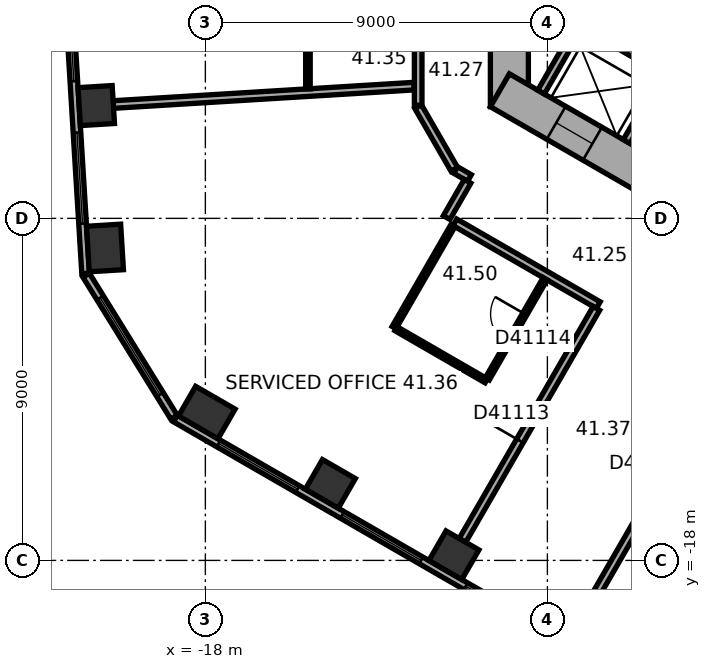
"""IFC4 building model, lengths in metres.
Left out: names, types, materials, properties, quantities, classifications, styles, units other than length and angle.
Written with IfcOpenShell. Run it as: python <this file> out.ifc"""

import sys

from ifc_helpers import new_model, si_unit, direction, frame, frame_2d, origin, origin_2d, place, context, subcontext, project, spatial, rectangle, extrude, element, fill, save


model = new_model("IFC4")
c1 = context("Model", 3, precision=1e-05, world=origin(), true_north=direction((0.0, 1.0)))
c2 = subcontext(c1, "Body", "Model", "MODEL_VIEW")
j1 = project(units=[si_unit("LENGTHUNIT", "METRE"), si_unit("PLANEANGLEUNIT", "RADIAN")], contexts=[c1])
p1 = place(None, origin())
s1 = spatial("IfcSite", under=j1, at=p1, CompositionType="ELEMENT")
p2 = place(p1, origin())
s2 = spatial("IfcBuilding", under=s1, at=p2, CompositionType="ELEMENT")
p3 = place(p2, frame((0.0, 0.0, 168.8)))
s3 = spatial("IfcBuildingStorey", under=s2, at=p3, CompositionType="ELEMENT", Elevation=168.8)
p4 = place(p3, frame((-20.871, -6.032, 0.0), z_axis=(0.0, 0.0, 1.0), x_axis=(0.061048539535, -0.998134798422, 0.0)))
e1 = element("IfcColumn", 1, at=p4, inside=s3, PredefinedType="COLUMN", context=c2, shape_type="SweptSolid", body=[
    extrude(rectangle(XDim=1.0, YDim=0.9, at=origin_2d()), origin(), (0.0, 0.0, 1.0), 3.7),
])
for number, where, z_axis, x_axis in (
    (2, (-20.642, -9.779, 0.0), (0.0, 0.0, 1.0), (0.061, -0.998, 0.0)),
    (3, (-17.962, -14.109, 0.0), (0.0, 0.0, 1.0), (0.866, -0.5, 0.0)),
):
    element("IfcColumn", number, at=place(p3, frame(where, z_axis=z_axis, x_axis=x_axis)), inside=s3, PredefinedType="COLUMN", context=c2, shape_type="SweptSolid", body=[
        extrude(rectangle(XDim=1.2, YDim=0.9, at=origin_2d()), origin(), (0.0, 0.0, 1.0), 3.7),
    ])
for number, where, z_axis, x_axis in (
    (4, (-14.711, -15.986, 0.0), (0.0, 0.0, 1.0), (0.866, -0.5, 0.0)),
    (5, (-11.46, -17.863, 0.0), (0.0, 0.0, 1.0), (0.866, -0.5, 0.0)),
):
    element("IfcColumn", number, at=place(p3, frame(where, z_axis=z_axis, x_axis=x_axis)), inside=s3, PredefinedType="COLUMN", context=c2, shape_type="SweptSolid", body=[
        extrude(rectangle(XDim=1.0, YDim=0.9, at=origin_2d()), origin(), (0.0, 0.0, 1.0), 3.7),
    ])
p5 = place(p3, frame((-10.0, 6.062, 0.0), z_axis=(0.0, 0.0, 1.0), x_axis=(0.0, -1.0, 0.0)))
e6 = element("IfcWall", 6, at=p5, inside=s3, PredefinedType="SHEAR", context=c2, shape_type="SweptSolid", body=[
    extrude(rectangle(XDim=12.125, YDim=1.0, at=frame_2d((6.062, 0.0))), origin(), (0.0, 0.0, 1.0), 3.7),
])
p6 = place(p5, frame((5.212, 0.0, 0.0)))
e7 = element("IfcOpeningElement", 7, at=p6, cuts=e6, PredefinedType="OPENING", context=c2, shape_type="SweptSolid", body=[
    extrude(rectangle(XDim=1.1, YDim=2.1, at=frame_2d((0.55, 1.05))), frame((0.0, 0.51, 0.0), z_axis=(0.0, -1.0, 0.0), x_axis=(1.0, 0.0, 0.0)), (0.0, 0.0, 1.0), 1.02),
])
p7 = place(p5, frame((7.812, 0.0, 0.0)))
e8 = element("IfcOpeningElement", 8, at=p7, cuts=e6, PredefinedType="OPENING", context=c2, shape_type="SweptSolid", body=[
    extrude(rectangle(XDim=1.1, YDim=2.1, at=frame_2d((0.55, 1.05))), frame((0.0, 0.51, 0.0), z_axis=(0.0, -1.0, 0.0), x_axis=(1.0, 0.0, 0.0)), (0.0, 0.0, 1.0), 1.02),
])
p8 = place(p3, frame((-10.25, -5.629, 0.0), z_axis=(0.0, 0.0, 1.0), x_axis=(0.866022616891, -0.50000482701, 0.0)))
e9 = element("IfcWall", 9, at=p8, inside=s3, PredefinedType="SHEAR", context=c2, shape_type="SweptSolid", body=[
    extrude(rectangle(XDim=12.125, YDim=1.0, at=frame_2d((6.062, 0.0))), origin(), (0.0, 0.0, 1.0), 3.7),
])
p9 = place(p8, frame((6.262, 0.0, 0.0)))
e10 = element("IfcOpeningElement", 10, at=p9, cuts=e9, PredefinedType="OPENING", context=c2, shape_type="SweptSolid", body=[
    extrude(rectangle(XDim=1.5, YDim=2.1, at=frame_2d((0.75, 1.05))), frame((0.0, 0.51, 0.0), z_axis=(0.0, -1.0, 0.0), x_axis=(1.0, 0.0, 0.0)), (0.0, 0.0, 1.0), 1.02),
])
p10 = place(p8, frame((1.712, 0.0, 0.0)))
e11 = element("IfcOpeningElement", 11, at=p10, cuts=e9, PredefinedType="OPENING", context=c2, shape_type="SweptSolid", body=[
    extrude(rectangle(XDim=1.1, YDim=2.1, at=frame_2d((0.55, 1.05))), frame((0.0, 0.51, 0.0), z_axis=(0.0, -1.0, 0.0), x_axis=(1.0, 0.0, 0.0)), (0.0, 0.0, 1.0), 1.02),
])
p11 = place(p8, frame((4.312, 0.0, 0.0)))
e12 = element("IfcOpeningElement", 12, at=p11, cuts=e9, PredefinedType="OPENING", context=c2, shape_type="SweptSolid", body=[
    extrude(rectangle(XDim=1.1, YDim=2.1, at=frame_2d((0.55, 1.05))), frame((0.0, 0.51, 0.0), z_axis=(0.0, -1.0, 0.0), x_axis=(1.0, 0.0, 0.0)), (0.0, 0.0, 1.0), 1.02),
])
p12 = place(p3, frame((-22.375, 9.557, 0.0), z_axis=(0.0, 0.0, 1.0), x_axis=(0.061036015339, -0.998135564356, 0.0)))
e13 = element("IfcWall", 13, at=p12, inside=s3, PredefinedType="STANDARD", context=c2, shape_type="SweptSolid", body=[
    extrude(rectangle(XDim=20.044, YDim=0.2, at=frame_2d((10.022, 0.0))), origin(), (0.0, 0.0, 1.0), 3.7),
])
p13 = place(p12, frame((1.313, 0.0, 0.9)))
e14 = element("IfcOpeningElement", 14, at=p13, cuts=e13, PredefinedType="OPENING", context=c2, shape_type="SweptSolid", body=[
    extrude(rectangle(XDim=2.4, YDim=2.0, at=frame_2d((1.2, 1.0))), frame((0.0, 0.11, 0.0), z_axis=(0.0, -1.0, 0.0), x_axis=(1.0, 0.0, 0.0)), (0.0, 0.0, 1.0), 0.22),
])
p14 = place(p12, frame((5.067, 0.0, 0.9)))
e15 = element("IfcOpeningElement", 15, at=p14, cuts=e13, PredefinedType="OPENING", context=c2, shape_type="SweptSolid", body=[
    extrude(rectangle(XDim=2.4, YDim=2.0, at=frame_2d((1.2, 1.0))), frame((0.0, 0.11, 0.0), z_axis=(0.0, -1.0, 0.0), x_axis=(1.0, 0.0, 0.0)), (0.0, 0.0, 1.0), 0.22),
])
p15 = place(p12, frame((8.821, 0.0, 0.9)))
e16 = element("IfcOpeningElement", 16, at=p15, cuts=e13, PredefinedType="OPENING", context=c2, shape_type="SweptSolid", body=[
    extrude(rectangle(XDim=2.4, YDim=2.0, at=frame_2d((1.2, 1.0))), frame((0.0, 0.11, 0.0), z_axis=(0.0, -1.0, 0.0), x_axis=(1.0, 0.0, 0.0)), (0.0, 0.0, 1.0), 0.22),
])
p16 = place(p12, frame((12.575, 0.0, 0.9)))
e17 = element("IfcOpeningElement", 17, at=p16, cuts=e13, PredefinedType="OPENING", context=c2, shape_type="SweptSolid", body=[
    extrude(rectangle(XDim=2.4, YDim=2.0, at=frame_2d((1.2, 1.0))), frame((0.0, 0.11, 0.0), z_axis=(0.0, -1.0, 0.0), x_axis=(1.0, 0.0, 0.0)), (0.0, 0.0, 1.0), 0.22),
])
p17 = place(p12, frame((16.329, 0.0, 0.9)))
e18 = element("IfcOpeningElement", 18, at=p17, cuts=e13, PredefinedType="OPENING", context=c2, shape_type="SweptSolid", body=[
    extrude(rectangle(XDim=2.4, YDim=2.0, at=frame_2d((1.2, 1.0))), frame((0.0, 0.11, 0.0), z_axis=(0.0, -1.0, 0.0), x_axis=(1.0, 0.0, 0.0)), (0.0, 0.0, 1.0), 0.22),
])
p18 = place(p3, frame((-21.137, -10.496, 0.0), z_axis=(0.0, 0.0, 1.0), x_axis=(0.526178661629, -0.850374044786, 0.0)))
e19 = element("IfcWall", 19, at=p18, inside=s3, PredefinedType="STANDARD", context=c2, shape_type="SweptSolid", body=[
    extrude(rectangle(XDim=4.395, YDim=0.2, at=frame_2d((2.197, 0.0))), origin(), (0.0, 0.0, 1.0), 3.7),
])
p19 = place(p18, frame((0.698, 0.0, 0.9)))
e20 = element("IfcOpeningElement", 20, at=p19, cuts=e19, PredefinedType="OPENING", context=c2, shape_type="SweptSolid", body=[
    extrude(rectangle(XDim=3.0, YDim=2.0, at=frame_2d((1.5, 1.0))), frame((0.0, 0.11, 0.0), z_axis=(0.0, -1.0, 0.0), x_axis=(1.0, 0.0, 0.0)), (0.0, 0.0, 1.0), 0.22),
])
p20 = place(p3, frame((-18.789, -14.267, 0.0), z_axis=(0.0, 0.0, 1.0), x_axis=(0.866023315909, -0.500003616288, 0.0)))
e21 = element("IfcWall", 21, at=p20, inside=s3, PredefinedType="STANDARD", context=c2, shape_type="SweptSolid", body=[
    extrude(rectangle(XDim=20.044, YDim=0.2, at=frame_2d((10.022, 0.0))), origin(), (0.0, 0.0, 1.0), 3.7),
])
p21 = place(p20, frame((1.314, 0.0, 0.9)))
e22 = element("IfcOpeningElement", 22, at=p21, cuts=e21, PredefinedType="OPENING", context=c2, shape_type="SweptSolid", body=[
    extrude(rectangle(XDim=2.4, YDim=2.0, at=frame_2d((1.2, 1.0))), frame((0.0, 0.11, 0.0), z_axis=(0.0, -1.0, 0.0), x_axis=(1.0, 0.0, 0.0)), (0.0, 0.0, 1.0), 0.22),
])
p22 = place(p20, frame((5.069, 0.0, 0.9)))
e23 = element("IfcOpeningElement", 23, at=p22, cuts=e21, PredefinedType="OPENING", context=c2, shape_type="SweptSolid", body=[
    extrude(rectangle(XDim=2.4, YDim=2.0, at=frame_2d((1.2, 1.0))), frame((0.0, 0.11, 0.0), z_axis=(0.0, -1.0, 0.0), x_axis=(1.0, 0.0, 0.0)), (0.0, 0.0, 1.0), 0.22),
])
p23 = place(p20, frame((8.823, 0.0, 0.9)))
e24 = element("IfcOpeningElement", 24, at=p23, cuts=e21, PredefinedType="OPENING", context=c2, shape_type="SweptSolid", body=[
    extrude(rectangle(XDim=2.4, YDim=2.0, at=frame_2d((1.2, 1.0))), frame((0.0, 0.11, 0.0), z_axis=(0.0, -1.0, 0.0), x_axis=(1.0, 0.0, 0.0)), (0.0, 0.0, 1.0), 0.22),
])
p24 = place(p20, frame((12.577, 0.0, 0.9)))
e25 = element("IfcOpeningElement", 25, at=p24, cuts=e21, PredefinedType="OPENING", context=c2, shape_type="SweptSolid", body=[
    extrude(rectangle(XDim=2.4, YDim=2.0, at=frame_2d((1.2, 1.0))), frame((0.0, 0.11, 0.0), z_axis=(0.0, -1.0, 0.0), x_axis=(1.0, 0.0, 0.0)), (0.0, 0.0, 1.0), 0.22),
])
p25 = place(p20, frame((16.331, 0.0, 0.9)))
e26 = element("IfcOpeningElement", 26, at=p25, cuts=e21, PredefinedType="OPENING", context=c2, shape_type="SweptSolid", body=[
    extrude(rectangle(XDim=2.4, YDim=2.0, at=frame_2d((1.2, 1.0))), frame((0.0, 0.11, 0.0), z_axis=(0.0, -1.0, 0.0), x_axis=(1.0, 0.0, 0.0)), (0.0, 0.0, 1.0), 0.22),
])
p26 = place(p3, frame((-8.203, -3.809, 0.0), z_axis=(0.0, 0.0, 1.0), x_axis=(0.866028230842, -0.499995103361, 0.0)))
e27 = element("IfcWall", 27, at=p26, inside=s3, PredefinedType="PARTITIONING", context=c2, shape_type="SweptSolid", body=[
    extrude(rectangle(XDim=5.4, YDim=0.2, at=frame_2d((2.7, 0.0))), origin(), (0.0, 0.0, 1.0), 3.42),
])
for number, where, z_axis, x_axis in (
    (28, (-8.067, -3.772, 0.0), (0.0, 0.0, 1.0), (-0.5, -0.866, 0.0)),
    (29, (-5.815, -5.072, 0.0), (0.0, 0.0, 1.0), (-0.5, -0.866, 0.0)),
):
    element("IfcWall", number, at=place(p3, frame(where, z_axis=z_axis, x_axis=x_axis)), inside=s3, PredefinedType="PARTITIONING", context=c2, shape_type="SweptSolid", body=[
        extrude(rectangle(XDim=2.2, YDim=0.2, at=frame_2d((1.1, 0.0))), origin(), (0.0, 0.0, 1.0), 3.42),
    ])
p27 = place(p3, frame((-20.421, -6.005, 0.0), z_axis=(0.0, 0.0, 1.0), x_axis=(0.998134865741, 0.061047438866, 0.0)))
e30 = element("IfcWall", 30, at=p27, inside=s3, PredefinedType="PARTITIONING", context=c2, shape_type="SweptSolid", body=[
    extrude(rectangle(XDim=7.927, YDim=0.2, at=frame_2d((3.963, 0.0))), origin(), (0.0, 0.0, 1.0), 2.87),
])
p28 = place(p3, frame((-15.301, 1.731, 0.0), z_axis=(0.0, 0.0, 1.0), x_axis=(0.0, -1.0, 0.0)))
e31 = element("IfcWall", 31, at=p28, inside=s3, PredefinedType="PARTITIONING", context=c2, shape_type="SweptSolid", body=[
    extrude(rectangle(XDim=7.322, YDim=0.12, at=frame_2d((3.661, 0.0))), origin(), (0.0, 0.0, 1.0), 3.42),
])
p29 = place(p28, frame((0.55, 0.0, 0.0)))
e32 = element("IfcOpeningElement", 32, at=p29, cuts=e31, PredefinedType="OPENING", context=c2, shape_type="SweptSolid", body=[
    extrude(rectangle(XDim=1.0, YDim=2.1, at=frame_2d((0.5, 1.05))), frame((0.0, 0.07, 0.0), z_axis=(0.0, -1.0, 0.0), x_axis=(1.0, 0.0, 0.0)), (0.0, 0.0, 1.0), 0.14),
])
p30 = place(p28, frame((2.736, 0.0, 0.0)))
e33 = element("IfcOpeningElement", 33, at=p30, cuts=e31, PredefinedType="OPENING", context=c2, shape_type="SweptSolid", body=[
    extrude(rectangle(XDim=0.9, YDim=2.1, at=frame_2d((0.45, 1.05))), frame((0.0, 0.07, 0.0), z_axis=(0.0, -1.0, 0.0), x_axis=(1.0, 0.0, 0.0)), (0.0, 0.0, 1.0), 0.14),
])
p31 = place(p28, frame((5.347, 0.0, 0.0)))
e34 = element("IfcOpeningElement", 34, at=p31, cuts=e31, PredefinedType="OPENING", context=c2, shape_type="SweptSolid", body=[
    extrude(rectangle(XDim=0.9, YDim=2.1, at=frame_2d((0.45, 1.05))), frame((0.0, 0.07, 0.0), z_axis=(0.0, -1.0, 0.0), x_axis=(1.0, 0.0, 0.0)), (0.0, 0.0, 1.0), 0.14),
])
p32 = place(p3, frame((-13.035, -11.875, 0.0), z_axis=(0.0, 0.0, 1.0), x_axis=(0.500026960575, 0.86600983753, 0.0)))
e35 = element("IfcWall", 35, at=p32, inside=s3, PredefinedType="PARTITIONING", context=c2, shape_type="SweptSolid", body=[
    extrude(rectangle(XDim=3.1, YDim=0.12, at=frame_2d((1.55, 0.0))), origin(), (0.0, 0.0, 1.0), 3.42),
])
p33 = place(p3, frame((-12.4, -6.062, 0.0), z_axis=(0.0, 0.0, 1.0), x_axis=(0.500022797313, -0.86601224135, 0.0)))
e36 = element("IfcWall", 36, at=p33, inside=s3, PredefinedType="PARTITIONING", context=c2, shape_type="SweptSolid", body=[
    extrude(rectangle(XDim=1.9, YDim=0.2, at=frame_2d((0.95, 0.0))), origin(), (0.0, 0.0, 1.0), 3.42),
])
p34 = place(p3, frame((-12.4, -4.201, 0.0), z_axis=(0.0, 0.0, 1.0), x_axis=(0.0, -1.0, 0.0)))
e37 = element("IfcWall", 37, at=p34, inside=s3, PredefinedType="PARTITIONING", context=c2, shape_type="SweptSolid", body=[
    extrude(rectangle(XDim=1.821, YDim=0.2, at=frame_2d((0.911, 0.0))), origin(), (0.0, 0.0, 1.0), 3.42),
])
p35 = place(p3, frame((-11.435, -9.103, 0.0), z_axis=(0.0, 0.0, 1.0), x_axis=(0.866007399799, -0.500031182522, 0.0)))
e38 = element("IfcWall", 38, at=p35, inside=s3, PredefinedType="PARTITIONING", context=c2, shape_type="SweptSolid", body=[
    extrude(rectangle(XDim=4.358, YDim=0.2, at=frame_2d((2.179, 0.0))), origin(), (0.0, 0.0, 1.0), 3.42),
])
p36 = place(p3, frame((-11.415, -7.728, 0.0), z_axis=(0.0, 0.0, 1.0), x_axis=(0.865915281873, -0.500190688257, 0.0)))
e39 = element("IfcWall", 39, at=p36, inside=s3, PredefinedType="PARTITIONING", context=c2, shape_type="SweptSolid", body=[
    extrude(rectangle(XDim=0.421, YDim=0.2, at=frame_2d((0.21, 0.0))), origin(), (0.0, 0.0, 1.0), 3.42),
])
p37 = place(p3, frame((-11.235, -17.474, 0.0), z_axis=(0.0, 0.0, 1.0), x_axis=(0.500009260695, 0.866020057054, 0.0)))
e40 = element("IfcWall", 40, at=p37, inside=s3, PredefinedType="PARTITIONING", context=c2, shape_type="SweptSolid", body=[
    extrude(rectangle(XDim=7.049, YDim=0.2, at=frame_2d((3.524, 0.0))), origin(), (0.0, 0.0, 1.0), 2.87),
])
p38 = place(p37, frame((3.024, 0.0, 0.0)))
e41 = element("IfcOpeningElement", 41, at=p38, cuts=e40, PredefinedType="OPENING", context=c2, shape_type="SweptSolid", body=[
    extrude(rectangle(XDim=1.0, YDim=2.1, at=frame_2d((0.5, 1.05))), frame((0.0, 0.11, 0.0), z_axis=(0.0, -1.0, 0.0), x_axis=(1.0, 0.0, 0.0)), (0.0, 0.0, 1.0), 0.22),
])
p39 = place(p3, frame((-11.101, -8.025, 0.0), z_axis=(0.0, 0.0, 1.0), x_axis=(-0.500074377092, -0.865982457891, 0.0)))
e42 = element("IfcWall", 42, at=p39, inside=s3, PredefinedType="PARTITIONING", context=c2, shape_type="SweptSolid", body=[
    extrude(rectangle(XDim=1.101, YDim=0.2, at=frame_2d((0.55, 0.0))), origin(), (0.0, 0.0, 1.0), 3.42),
])
p40 = place(p3, frame((-10.61, -13.275, 0.0), z_axis=(0.0, 0.0, 1.0), x_axis=(-0.866019409031, 0.500010383074, 0.0)))
e43 = element("IfcWall", 43, at=p40, inside=s3, PredefinedType="PARTITIONING", context=c2, shape_type="SweptSolid", body=[
    extrude(rectangle(XDim=2.74, YDim=0.12, at=frame_2d((1.37, 0.0))), origin(), (0.0, 0.0, 1.0), 3.42),
])
p41 = place(p3, frame((-9.06, -10.59, 0.0), z_axis=(0.0, 0.0, 1.0), x_axis=(-0.49993101378, -0.866065229334, 0.0)))
e44 = element("IfcWall", 44, at=p41, inside=s3, PredefinedType="PARTITIONING", context=c2, shape_type="SweptSolid", body=[
    extrude(rectangle(XDim=3.04, YDim=0.12, at=frame_2d((1.52, 0.0))), origin(), (0.0, 0.0, 1.0), 3.42),
])
p42 = place(p41, frame((1.07, 0.0, 0.0)))
e45 = element("IfcOpeningElement", 45, at=p42, cuts=e44, PredefinedType="OPENING", context=c2, shape_type="SweptSolid", body=[
    extrude(rectangle(XDim=0.9, YDim=2.1, at=frame_2d((0.45, 1.05))), frame((0.0, 0.07, 0.0), z_axis=(0.0, -1.0, 0.0), x_axis=(1.0, 0.0, 0.0)), (0.0, 0.0, 1.0), 0.14),
])
p43 = place(p3, frame((-7.984, -19.351, 0.0), z_axis=(0.0, 0.0, 1.0), x_axis=(0.500010139422, 0.866019549707, 0.0)))
e46 = element("IfcWall", 46, at=p43, inside=s3, PredefinedType="PARTITIONING", context=c2, shape_type="SweptSolid", body=[
    extrude(rectangle(XDim=8.35, YDim=0.2, at=frame_2d((4.175, 0.0))), origin(), (0.0, 0.0, 1.0), 3.42),
])
p44 = place(p43, frame((3.675, 0.0, 0.0)))
e47 = element("IfcOpeningElement", 47, at=p44, cuts=e46, PredefinedType="OPENING", context=c2, shape_type="SweptSolid", body=[
    extrude(rectangle(XDim=1.0, YDim=2.1, at=frame_2d((0.5, 1.05))), frame((0.0, 0.11, 0.0), z_axis=(0.0, -1.0, 0.0), x_axis=(1.0, 0.0, 0.0)), (0.0, 0.0, 1.0), 0.22),
])
p45 = place(p16, origin())
e48 = element("IfcWindow", 48, at=p45, inside=s3, PartitioningType="SINGLE_PANEL", PredefinedType="WINDOW", context=c2, shape_type="SweptSolid", body=[
    extrude(rectangle(XDim=2.4, YDim=2.0, at=frame_2d((1.2, 1.0))), frame((0.0, 0.03, 0.0), z_axis=(0.0, -1.0, 0.0), x_axis=(1.0, 0.0, 0.0)), (0.0, 0.0, 1.0), 0.06),
])
fill(e17, e48)
p46 = place(p17, origin())
e49 = element("IfcWindow", 49, at=p46, inside=s3, PartitioningType="SINGLE_PANEL", PredefinedType="WINDOW", context=c2, shape_type="SweptSolid", body=[
    extrude(rectangle(XDim=2.4, YDim=2.0, at=frame_2d((1.2, 1.0))), frame((0.0, 0.03, 0.0), z_axis=(0.0, -1.0, 0.0), x_axis=(1.0, 0.0, 0.0)), (0.0, 0.0, 1.0), 0.06),
])
fill(e18, e49)
p47 = place(p19, origin())
e50 = element("IfcWindow", 50, at=p47, inside=s3, PartitioningType="SINGLE_PANEL", PredefinedType="WINDOW", context=c2, shape_type="SweptSolid", body=[
    extrude(rectangle(XDim=3.0, YDim=2.0, at=frame_2d((1.5, 1.0))), frame((0.0, 0.03, 0.0), z_axis=(0.0, -1.0, 0.0), x_axis=(1.0, 0.0, 0.0)), (0.0, 0.0, 1.0), 0.06),
])
fill(e20, e50)
p48 = place(p21, origin())
e51 = element("IfcWindow", 51, at=p48, inside=s3, PartitioningType="SINGLE_PANEL", PredefinedType="WINDOW", context=c2, shape_type="SweptSolid", body=[
    extrude(rectangle(XDim=2.4, YDim=2.0, at=frame_2d((1.2, 1.0))), frame((0.0, 0.03, 0.0), z_axis=(0.0, -1.0, 0.0), x_axis=(1.0, 0.0, 0.0)), (0.0, 0.0, 1.0), 0.06),
])
fill(e22, e51)
p49 = place(p22, origin())
e52 = element("IfcWindow", 52, at=p49, inside=s3, PartitioningType="SINGLE_PANEL", PredefinedType="WINDOW", context=c2, shape_type="SweptSolid", body=[
    extrude(rectangle(XDim=2.4, YDim=2.0, at=frame_2d((1.2, 1.0))), frame((0.0, 0.03, 0.0), z_axis=(0.0, -1.0, 0.0), x_axis=(1.0, 0.0, 0.0)), (0.0, 0.0, 1.0), 0.06),
])
fill(e23, e52)
p50 = place(p23, origin())
e53 = element("IfcWindow", 53, at=p50, inside=s3, PartitioningType="SINGLE_PANEL", PredefinedType="WINDOW", context=c2, shape_type="SweptSolid", body=[
    extrude(rectangle(XDim=2.4, YDim=2.0, at=frame_2d((1.2, 1.0))), frame((0.0, 0.03, 0.0), z_axis=(0.0, -1.0, 0.0), x_axis=(1.0, 0.0, 0.0)), (0.0, 0.0, 1.0), 0.06),
])
fill(e24, e53)
p51 = place(p10, origin())
e54 = element("IfcDoor", 54, at=p51, inside=s3, OperationType="DOUBLE_DOOR_SLIDING", PredefinedType="DOOR", context=c2, shape_type="SweptSolid", body=[
    extrude(rectangle(XDim=1.1, YDim=2.1, at=frame_2d((0.55, 1.05))), frame((0.0, 0.025, 0.0), z_axis=(0.0, -1.0, 0.0), x_axis=(1.0, 0.0, 0.0)), (0.0, 0.0, 1.0), 0.05),
])
fill(e11, e54)
p52 = place(p38, origin())
e55 = element("IfcDoor", 55, at=p52, inside=s3, OperationType="SINGLE_SWING_LEFT", PredefinedType="DOOR", context=c2, shape_type="SweptSolid", body=[
    extrude(rectangle(XDim=1.0, YDim=2.1, at=frame_2d((0.5, 1.05))), frame((0.0, 0.025, 0.0), z_axis=(0.0, -1.0, 0.0), x_axis=(1.0, 0.0, 0.0)), (0.0, 0.0, 1.0), 0.05),
])
fill(e41, e55)
p53 = place(p42, origin())
e56 = element("IfcDoor", 56, at=p53, inside=s3, OperationType="SINGLE_SWING_LEFT", PredefinedType="DOOR", context=c2, shape_type="SweptSolid", body=[
    extrude(rectangle(XDim=0.9, YDim=2.1, at=frame_2d((0.45, 1.05))), frame((0.0, 0.025, 0.0), z_axis=(0.0, -1.0, 0.0), x_axis=(1.0, 0.0, 0.0)), (0.0, 0.0, 1.0), 0.05),
])
fill(e45, e56)
save(model, sys.argv[1])
